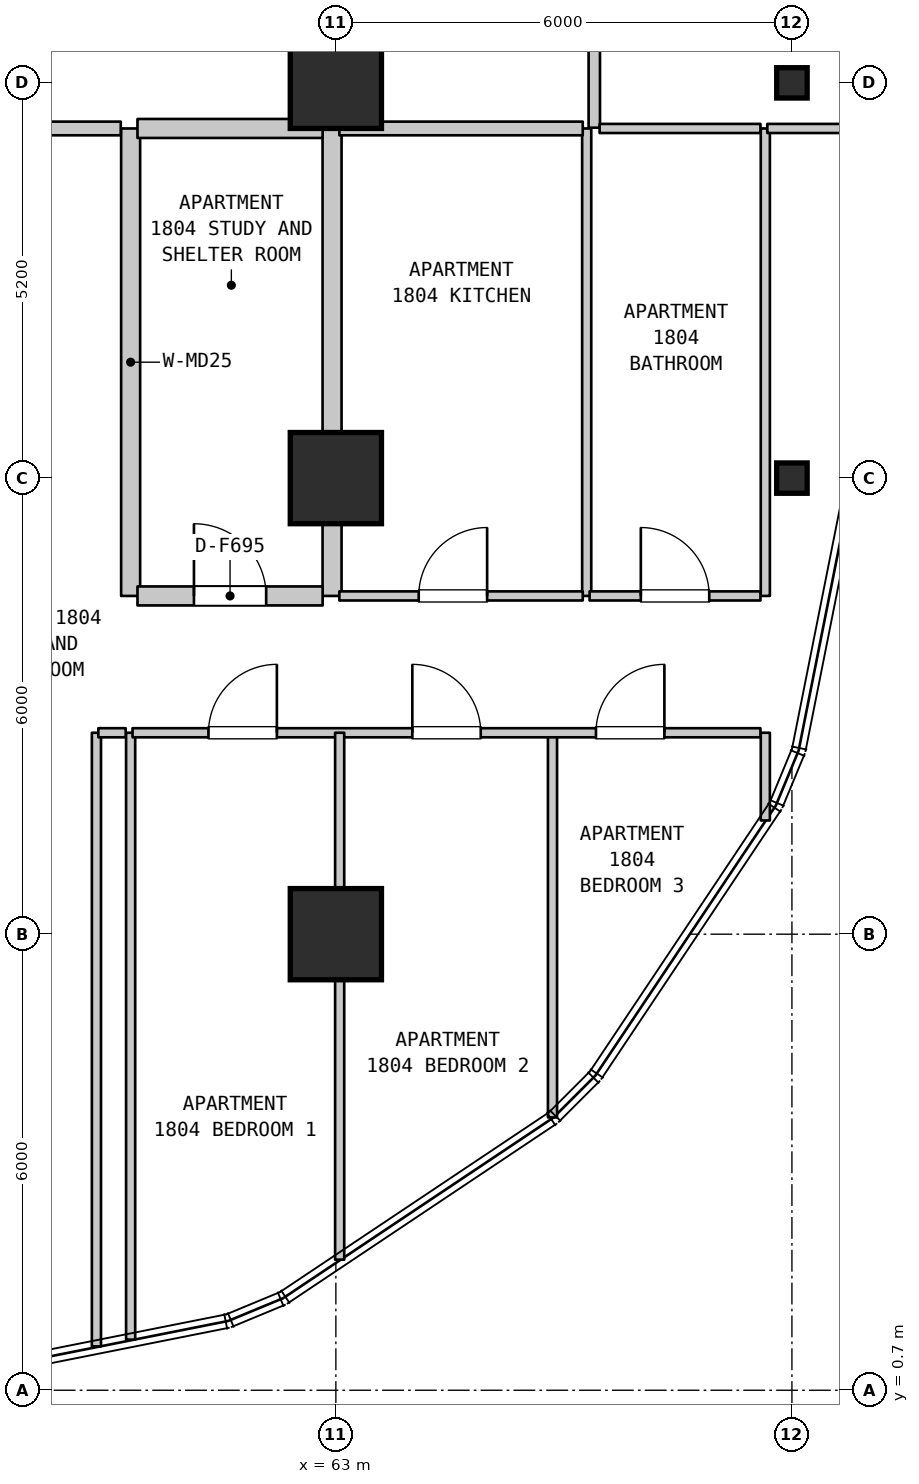
"""IFC4 building model, lengths in metres.
Left out: names, types, materials, properties, quantities, classifications, styles, units other than length and angle.
Written with IfcOpenShell. Run it as: python <this file> out.ifc"""

import sys

from ifc_helpers import new_model, si_unit, direction, frame, frame_2d, origin, origin_2d, place, context, subcontext, project, spatial, rectangle, i_section, extrude, element, fill, save


model = new_model("IFC4")
c1 = context("Model", 3, precision=1e-05, world=origin(), true_north=direction((0.0, 1.0)))
c2 = subcontext(c1, "Body", "Model", "MODEL_VIEW")
j1 = project(units=[si_unit("LENGTHUNIT", "METRE"), si_unit("PLANEANGLEUNIT", "RADIAN")], contexts=[c1])
p1 = place(None, origin())
s1 = spatial("IfcSite", under=j1, at=p1, CompositionType="ELEMENT")
p2 = place(p1, origin())
s2 = spatial("IfcBuilding", under=s1, at=p2, CompositionType="ELEMENT")
p3 = place(p2, frame((0.0, 0.0, 77.5)))
s3 = spatial("IfcBuildingStorey", under=s2, at=p3, CompositionType="ELEMENT", Elevation=77.5)
for number, where, z_axis, x_axis in (
    (1, (63.0, 6.7, 0.0), (0.0, 0.0, 1.0), (1.0, 0.0, 0.0)),
    (2, (63.0, 12.7, 0.0), (0.0, 0.0, 1.0), (1.0, 0.0, 0.0)),
    (3, (63.0, 17.9, 0.0), (0.0, 0.0, 1.0), (1.0, 0.0, 0.0)),
):
    element("IfcColumn", number, at=place(p3, frame(where, z_axis=z_axis, x_axis=x_axis)), inside=s3, PredefinedType="COLUMN", context=c2, shape_type="SweptSolid", body=[
        extrude(rectangle(XDim=1.2, YDim=1.2, at=origin_2d()), origin(), (0.0, 0.0, 1.0), 3.7),
    ])
for number, where, z_axis, x_axis in (
    (4, (69.0, 12.7, 0.0), (0.0, 0.0, 1.0), (1.0, 0.0, 0.0)),
    (5, (69.0, 17.9, 0.0), (0.0, 0.0, 1.0), (1.0, 0.0, 0.0)),
):
    element("IfcColumn", number, at=place(p3, frame(where, z_axis=z_axis, x_axis=x_axis)), inside=s3, PredefinedType="COLUMN", context=c2, shape_type="SweptSolid", body=[
        extrude(i_section(OverallWidth=0.401, OverallDepth=0.399, WebThickness=0.025, FlangeThickness=0.04, FilletRadius=0.015, at=origin_2d()), origin(), (0.0, 0.0, 1.0), 3.7),
    ])
p4 = place(p3, frame((59.85, 1.277, 0.0), z_axis=(0.0, 0.0, 1.0), x_axis=(0.0, 1.0, 0.0)))
e6 = element("IfcWall", 6, at=p4, inside=s3, PredefinedType="PARTITIONING", context=c2, shape_type="SweptSolid", body=[
    extrude(rectangle(XDim=8.073, YDim=0.12, at=frame_2d((4.037, 0.0))), origin(), (0.0, 0.0, 1.0), 3.28),
])
p5 = place(p3, frame((60.3, 1.366, 0.0), z_axis=(0.0, 0.0, 1.0), x_axis=(0.0, 1.0, 0.0)))
e7 = element("IfcWall", 7, at=p5, inside=s3, PredefinedType="PARTITIONING", context=c2, shape_type="SweptSolid", body=[
    extrude(rectangle(XDim=7.984, YDim=0.12, at=frame_2d((3.992, 0.0))), origin(), (0.0, 0.0, 1.0), 3.28),
])
p6 = place(p3, frame((60.3, 11.15, 0.0), z_axis=(0.0, 0.0, 1.0), x_axis=(0.0, 1.0, 0.0)))
e8 = element("IfcWall", 8, at=p6, inside=s3, PredefinedType="STANDARD", context=c2, shape_type="SweptSolid", body=[
    extrude(rectangle(XDim=6.15, YDim=0.25, at=frame_2d((3.075, 0.0))), origin(), (0.0, 0.0, 1.0), 3.28),
])
p7 = place(p3, frame((62.95, 11.15, 0.0), z_axis=(0.0, 0.0, 1.0), x_axis=(0.0, 1.0, 0.0)))
e9 = element("IfcWall", 9, at=p7, inside=s3, PredefinedType="STANDARD", context=c2, shape_type="SweptSolid", body=[
    extrude(rectangle(XDim=6.15, YDim=0.25, at=frame_2d((3.075, 0.0))), origin(), (0.0, 0.0, 1.0), 2.78),
])
p8 = place(p3, frame((63.05, 2.418, 0.0), z_axis=(0.0, 0.0, 1.0), x_axis=(0.0, 1.0, 0.0)))
e10 = element("IfcWall", 10, at=p8, inside=s3, PredefinedType="PARTITIONING", context=c2, shape_type="SweptSolid", body=[
    extrude(rectangle(XDim=4.282, YDim=0.12, at=frame_2d((2.141, 0.0))), origin(), (0.0, 0.0, 1.0), 3.28),
])
p9 = place(p3, frame((65.85, 4.289, 0.0), z_axis=(0.0, 0.0, 1.0), x_axis=(0.0, 1.0, 0.0)))
e11 = element("IfcWall", 11, at=p9, inside=s3, PredefinedType="PARTITIONING", context=c2, shape_type="SweptSolid", body=[
    extrude(rectangle(XDim=5.061, YDim=0.12, at=frame_2d((2.531, 0.0))), origin(), (0.0, 0.0, 1.0), 3.28),
])
p10 = place(p3, frame((66.3, 11.15, 0.0), z_axis=(0.0, 0.0, 1.0), x_axis=(0.0, 1.0, 0.0)))
e12 = element("IfcWall", 12, at=p10, inside=s3, PredefinedType="PARTITIONING", context=c2, shape_type="SweptSolid", body=[
    extrude(rectangle(XDim=6.15, YDim=0.12, at=frame_2d((3.075, 0.0))), origin(), (0.0, 0.0, 1.0), 3.28),
])
p11 = place(p3, frame((66.4, 17.31, 0.0), z_axis=(0.0, 0.0, 1.0), x_axis=(0.0, 1.0, 0.0)))
e13 = element("IfcWall", 13, at=p11, inside=s3, PredefinedType="STANDARD", context=c2, shape_type="SweptSolid", body=[
    extrude(rectangle(XDim=2.19, YDim=0.15, at=frame_2d((1.095, 0.0))), origin(), (0.0, 0.0, 1.0), 3.28),
])
p12 = place(p3, frame((68.65, 8.196, 0.0), z_axis=(0.0, 0.0, 1.0), x_axis=(0.0, 1.0, 0.0)))
e14 = element("IfcWall", 14, at=p12, inside=s3, PredefinedType="PARTITIONING", context=c2, shape_type="SweptSolid", body=[
    extrude(rectangle(XDim=1.154, YDim=0.12, at=frame_2d((0.577, 0.0))), origin(), (0.0, 0.0, 1.0), 3.28),
])
p13 = place(p3, frame((68.65, 11.15, 0.0), z_axis=(0.0, 0.0, 1.0), x_axis=(0.0, 1.0, 0.0)))
e15 = element("IfcWall", 15, at=p13, inside=s3, PredefinedType="PARTITIONING", context=c2, shape_type="SweptSolid", body=[
    extrude(rectangle(XDim=6.15, YDim=0.12, at=frame_2d((3.075, 0.0))), origin(), (0.0, 0.0, 1.0), 3.28),
])
p14 = place(p3, frame((59.875, 9.35, 0.0), z_axis=(0.0, 0.0, 1.0), x_axis=(1.0, 0.0, 0.0)))
e16 = element("IfcWall", 16, at=p14, inside=s3, PredefinedType="PARTITIONING", context=c2, shape_type="SweptSolid", body=[
    extrude(rectangle(XDim=0.36, YDim=0.12, at=frame_2d((0.18, 0.0))), origin(), (0.0, 0.0, 1.0), 3.28),
])
p15 = place(p3, frame((60.325, 9.35, 0.0), z_axis=(0.0, 0.0, 1.0), x_axis=(1.0, 0.0, 0.0)))
e17 = element("IfcWall", 17, at=p15, inside=s3, PredefinedType="PARTITIONING", context=c2, shape_type="SweptSolid", body=[
    extrude(rectangle(XDim=8.261, YDim=0.12, at=frame_2d((4.13, 0.0))), origin(), (0.0, 0.0, 1.0), 3.28),
])
p16 = place(p15, frame((0.999, 0.0, 0.0)))
e18 = element("IfcOpeningElement", 18, at=p16, cuts=e17, PredefinedType="OPENING", context=c2, shape_type="SweptSolid", body=[
    extrude(rectangle(XDim=0.9, YDim=2.15, at=frame_2d((0.45, 1.075))), frame((0.0, 0.07, 0.0), z_axis=(0.0, -1.0, 0.0), x_axis=(1.0, 0.0, 0.0)), (0.0, 0.0, 1.0), 0.14),
])
p17 = place(p15, frame((3.681, 0.0, 0.0)))
e19 = element("IfcOpeningElement", 19, at=p17, cuts=e17, PredefinedType="OPENING", context=c2, shape_type="SweptSolid", body=[
    extrude(rectangle(XDim=0.9, YDim=2.15, at=frame_2d((0.45, 1.075))), frame((0.0, 0.07, 0.0), z_axis=(0.0, -1.0, 0.0), x_axis=(1.0, 0.0, 0.0)), (0.0, 0.0, 1.0), 0.14),
])
p18 = place(p15, frame((6.097, 0.0, 0.0)))
e20 = element("IfcOpeningElement", 20, at=p18, cuts=e17, PredefinedType="OPENING", context=c2, shape_type="SweptSolid", body=[
    extrude(rectangle(XDim=0.9, YDim=2.15, at=frame_2d((0.45, 1.075))), frame((0.0, 0.07, 0.0), z_axis=(0.0, -1.0, 0.0), x_axis=(1.0, 0.0, 0.0)), (0.0, 0.0, 1.0), 0.14),
])
p19 = place(p3, frame((60.39, 11.15, 0.0), z_axis=(0.0, 0.0, 1.0), x_axis=(1.0, 0.0, 0.0)))
e21 = element("IfcWall", 21, at=p19, inside=s3, PredefinedType="STANDARD", context=c2, shape_type="SweptSolid", body=[
    extrude(rectangle(XDim=2.436, YDim=0.25, at=frame_2d((1.218, 0.0))), origin(), (0.0, 0.0, 1.0), 3.28),
])
p20 = place(p19, frame((0.743, 0.0, 0.0)))
e22 = element("IfcOpeningElement", 22, at=p20, cuts=e21, PredefinedType="OPENING", context=c2, shape_type="SweptSolid", body=[
    extrude(rectangle(XDim=0.95, YDim=2.15, at=frame_2d((0.475, 1.075))), frame((0.0, 0.135, 0.0), z_axis=(0.0, -1.0, 0.0), x_axis=(1.0, 0.0, 0.0)), (0.0, 0.0, 1.0), 0.27),
])
p21 = place(p3, frame((63.046, 11.15, 0.0), z_axis=(0.0, 0.0, 1.0), x_axis=(1.0, 0.0, 0.0)))
e23 = element("IfcWall", 23, at=p21, inside=s3, PredefinedType="PARTITIONING", context=c2, shape_type="SweptSolid", body=[
    extrude(rectangle(XDim=3.202, YDim=0.12, at=frame_2d((1.601, 0.0))), origin(), (0.0, 0.0, 1.0), 3.28),
])
p22 = place(p21, frame((1.044, 0.0, 0.0)))
e24 = element("IfcOpeningElement", 24, at=p22, cuts=e23, PredefinedType="OPENING", context=c2, shape_type="SweptSolid", body=[
    extrude(rectangle(XDim=0.9, YDim=2.15, at=frame_2d((0.45, 1.075))), frame((0.0, 0.07, 0.0), z_axis=(0.0, -1.0, 0.0), x_axis=(1.0, 0.0, 0.0)), (0.0, 0.0, 1.0), 0.14),
])
p23 = place(p3, frame((66.338, 11.15, 0.0), z_axis=(0.0, 0.0, 1.0), x_axis=(1.0, 0.0, 0.0)))
e25 = element("IfcWall", 25, at=p23, inside=s3, PredefinedType="PARTITIONING", context=c2, shape_type="SweptSolid", body=[
    extrude(rectangle(XDim=2.248, YDim=0.12, at=frame_2d((1.124, 0.0))), origin(), (0.0, 0.0, 1.0), 3.28),
])
p24 = place(p23, frame((0.674, 0.0, 0.0)))
e26 = element("IfcOpeningElement", 26, at=p24, cuts=e25, PredefinedType="OPENING", context=c2, shape_type="SweptSolid", body=[
    extrude(rectangle(XDim=0.9, YDim=2.1, at=frame_2d((0.45, 1.05))), frame((0.0, 0.07, 0.0), z_axis=(0.0, -1.0, 0.0), x_axis=(1.0, 0.0, 0.0)), (0.0, 0.0, 1.0), 0.14),
])
p25 = place(p3, frame((54.625, 17.3, 0.0), z_axis=(0.0, 0.0, 1.0), x_axis=(1.0, 0.0, 0.0)))
e27 = element("IfcWall", 27, at=p25, inside=s3, PredefinedType="STANDARD", context=c2, shape_type="SweptSolid", body=[
    extrude(rectangle(XDim=5.545, YDim=0.18, at=frame_2d((2.772, 0.0))), origin(), (0.0, 0.0, 1.0), 3.28),
])
p26 = place(p25, frame((3.138, 0.0, 0.0)))
e28 = element("IfcOpeningElement", 28, at=p26, cuts=e27, PredefinedType="OPENING", context=c2, shape_type="SweptSolid", body=[
    extrude(rectangle(XDim=1.0, YDim=2.15, at=frame_2d((0.5, 1.075))), frame((0.0, 0.1, 0.0), z_axis=(0.0, -1.0, 0.0), x_axis=(1.0, 0.0, 0.0)), (0.0, 0.0, 1.0), 0.2),
])
p27 = place(p3, frame((60.39, 17.3, 0.0), z_axis=(0.0, 0.0, 1.0), x_axis=(1.0, 0.0, 0.0)))
e29 = element("IfcWall", 29, at=p27, inside=s3, PredefinedType="STANDARD", context=c2, shape_type="SweptSolid", body=[
    extrude(rectangle(XDim=2.436, YDim=0.25, at=frame_2d((1.218, 0.0))), origin(), (0.0, 0.0, 1.0), 3.28),
])
p28 = place(p3, frame((63.046, 17.3, 0.0), z_axis=(0.0, 0.0, 1.0), x_axis=(1.0, 0.0, 0.0)))
e30 = element("IfcWall", 30, at=p28, inside=s3, PredefinedType="STANDARD", context=c2, shape_type="SweptSolid", body=[
    extrude(rectangle(XDim=3.202, YDim=0.18, at=frame_2d((1.601, 0.0))), origin(), (0.0, 0.0, 1.0), 3.28),
])
p29 = place(p3, frame((66.47, 17.3, 0.0), z_axis=(0.0, 0.0, 1.0), x_axis=(1.0, 0.0, 0.0)))
e31 = element("IfcWall", 31, at=p29, inside=s3, PredefinedType="PARTITIONING", context=c2, shape_type="SweptSolid", body=[
    extrude(rectangle(XDim=2.116, YDim=0.12, at=frame_2d((1.058, 0.0))), origin(), (0.0, 0.0, 1.0), 3.28),
])
p30 = place(p3, frame((68.676, 17.3, 0.0), z_axis=(0.0, 0.0, 1.0), x_axis=(1.0, 0.0, 0.0)))
e32 = element("IfcWall", 32, at=p30, inside=s3, PredefinedType="PARTITIONING", context=c2, shape_type="SweptSolid", body=[
    extrude(rectangle(XDim=1.314, YDim=0.12, at=frame_2d((0.657, 0.0))), origin(), (0.0, 0.0, 1.0), 3.28),
])
p31 = place(p3, frame((63.05, 6.7, 0.0), z_axis=(0.0, 0.0, 1.0), x_axis=(0.0, 1.0, 0.0)))
e33 = element("IfcWall", 33, at=p31, inside=s3, PredefinedType="PARTITIONING", context=c2, shape_type="SweptSolid", body=[
    extrude(rectangle(XDim=2.65, YDim=0.12, at=frame_2d((1.325, 0.0))), origin(), (0.0, 0.0, 1.0), 2.78),
])
p32 = place(p16, origin())
e34 = element("IfcDoor", 34, at=p32, inside=s3, OperationType="SINGLE_SWING_RIGHT", PredefinedType="DOOR", context=c2, shape_type="SweptSolid", body=[
    extrude(rectangle(XDim=0.9, YDim=2.15, at=frame_2d((0.45, 1.075))), frame((0.0, 0.025, 0.0), z_axis=(0.0, -1.0, 0.0), x_axis=(1.0, 0.0, 0.0)), (0.0, 0.0, 1.0), 0.05),
])
fill(e18, e34)
p33 = place(p17, origin())
e35 = element("IfcDoor", 35, at=p33, inside=s3, OperationType="SINGLE_SWING_LEFT", PredefinedType="DOOR", context=c2, shape_type="SweptSolid", body=[
    extrude(rectangle(XDim=0.9, YDim=2.15, at=frame_2d((0.45, 1.075))), frame((0.0, 0.025, 0.0), z_axis=(0.0, -1.0, 0.0), x_axis=(1.0, 0.0, 0.0)), (0.0, 0.0, 1.0), 0.05),
])
fill(e19, e35)
p34 = place(p18, origin())
e36 = element("IfcDoor", 36, at=p34, inside=s3, OperationType="SINGLE_SWING_RIGHT", PredefinedType="DOOR", context=c2, shape_type="SweptSolid", body=[
    extrude(rectangle(XDim=0.9, YDim=2.15, at=frame_2d((0.45, 1.075))), frame((0.0, 0.025, 0.0), z_axis=(0.0, -1.0, 0.0), x_axis=(1.0, 0.0, 0.0)), (0.0, 0.0, 1.0), 0.05),
])
fill(e20, e36)
p35 = place(p20, origin())
e37 = element("IfcDoor", 37, at=p35, inside=s3, OperationType="SINGLE_SWING_LEFT", PredefinedType="DOOR", context=c2, shape_type="SweptSolid", body=[
    extrude(rectangle(XDim=0.95, YDim=2.15, at=frame_2d((0.475, 1.075))), frame((0.0, 0.025, 0.0), z_axis=(0.0, -1.0, 0.0), x_axis=(1.0, 0.0, 0.0)), (0.0, 0.0, 1.0), 0.05),
])
fill(e22, e37)
p36 = place(p22, origin())
e38 = element("IfcDoor", 38, at=p36, inside=s3, OperationType="SINGLE_SWING_RIGHT", PredefinedType="DOOR", context=c2, shape_type="SweptSolid", body=[
    extrude(rectangle(XDim=0.9, YDim=2.15, at=frame_2d((0.45, 1.075))), frame((0.0, 0.025, 0.0), z_axis=(0.0, -1.0, 0.0), x_axis=(1.0, 0.0, 0.0)), (0.0, 0.0, 1.0), 0.05),
])
fill(e24, e38)
p37 = place(p24, origin())
e39 = element("IfcDoor", 39, at=p37, inside=s3, OperationType="SINGLE_SWING_LEFT", PredefinedType="DOOR", context=c2, shape_type="SweptSolid", body=[
    extrude(rectangle(XDim=0.9, YDim=2.1, at=frame_2d((0.45, 1.05))), frame((0.0, 0.025, 0.0), z_axis=(0.0, -1.0, 0.0), x_axis=(1.0, 0.0, 0.0)), (0.0, 0.0, 1.0), 0.05),
])
fill(e26, e39)
save(model, sys.argv[1])
